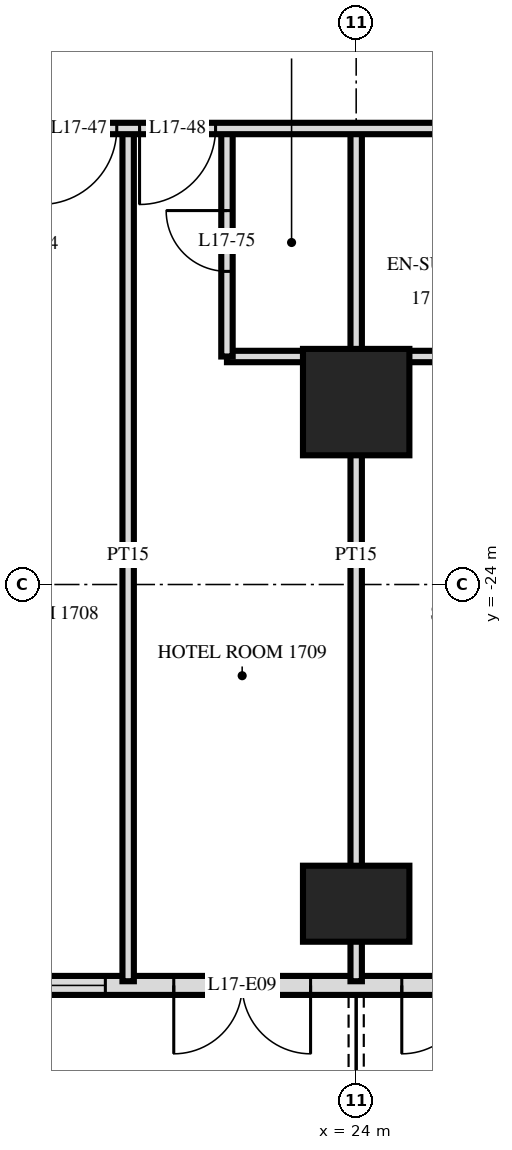
"""IFC4 building model, lengths in metres.
Left out: names, types, materials, properties, quantities, classifications, styles, units other than length and angle.
Written with IfcOpenShell. Run it as: python <this file> out.ifc"""

import sys

from ifc_helpers import new_model, si_unit, direction, frame, frame_2d, origin, origin_2d, place, context, subcontext, project, spatial, rectangle, extrude, element, fill, save


model = new_model("IFC4")
c1 = context("Model", 3, precision=1e-05, world=origin(), true_north=direction((0.0, 1.0)))
c2 = subcontext(c1, "Body", "Model", "MODEL_VIEW")
j1 = project(units=[si_unit("LENGTHUNIT", "METRE"), si_unit("PLANEANGLEUNIT", "RADIAN")], contexts=[c1])
p1 = place(None, origin())
s1 = spatial("IfcSite", under=j1, at=p1, CompositionType="ELEMENT")
p2 = place(p1, origin())
s2 = spatial("IfcBuilding", under=s1, at=p2, CompositionType="ELEMENT")
p3 = place(p2, frame((0.0, 0.0, 70.8)))
s3 = spatial("IfcBuildingStorey", under=s2, at=p3, CompositionType="ELEMENT", Elevation=70.8)
p4 = place(p3, frame((24.0, -28.2, 0.0), z_axis=(0.0, 0.0, 1.0), x_axis=(1.0, 0.0, 0.0)))
e1 = element("IfcColumn", 1, at=p4, inside=s3, PredefinedType="COLUMN", context=c2, shape_type="SweptSolid", body=[
    extrude(rectangle(XDim=1.4, YDim=1.0, at=origin_2d()), origin(), (0.0, 0.0, 1.0), 3.6),
])
p5 = place(p3, frame((24.0, -21.6, 0.0), z_axis=(0.0, 0.0, 1.0), x_axis=(1.0, 0.0, 0.0)))
e2 = element("IfcColumn", 2, at=p5, inside=s3, PredefinedType="COLUMN", context=c2, shape_type="SweptSolid", body=[
    extrude(rectangle(XDim=1.4, YDim=1.4, at=origin_2d()), origin(), (0.0, 0.0, 1.0), 3.6),
])
p6 = place(p3, frame((-28.775, -29.275, 0.0), z_axis=(0.0, 0.0, 1.0), x_axis=(1.0, 0.0, 0.0)))
e3 = element("IfcWall", 3, at=p6, inside=s3, PredefinedType="SOLIDWALL", context=c2, shape_type="SweptSolid", body=[
    extrude(rectangle(XDim=57.551, YDim=0.25, at=frame_2d((28.775, 0.0))), origin(), (0.0, 0.0, 1.0), 3.32),
])
p7 = place(p6, frame((0.575, 0.0, 0.0)))
e4 = element("IfcOpeningElement", 4, at=p7, cuts=e3, PredefinedType="OPENING", context=c2, shape_type="SweptSolid", body=[
    extrude(rectangle(XDim=1.8, YDim=2.4, at=frame_2d((0.9, 1.2))), frame((0.0, 0.135, 0.0), z_axis=(0.0, -1.0, 0.0), x_axis=(1.0, 0.0, 0.0)), (0.0, 0.0, 1.0), 0.27),
])
p8 = place(p6, frame((5.075, 0.0, 0.3)))
e5 = element("IfcOpeningElement", 5, at=p8, cuts=e3, PredefinedType="OPENING", context=c2, shape_type="SweptSolid", body=[
    extrude(rectangle(XDim=2.4, YDim=2.1, at=frame_2d((1.2, 1.05))), frame((0.0, 0.135, 0.0), z_axis=(0.0, -1.0, 0.0), x_axis=(1.0, 0.0, 0.0)), (0.0, 0.0, 1.0), 0.27),
])
p9 = place(p6, frame((8.375, 0.0, 0.0)))
e6 = element("IfcOpeningElement", 6, at=p9, cuts=e3, PredefinedType="OPENING", context=c2, shape_type="SweptSolid", body=[
    extrude(rectangle(XDim=1.8, YDim=2.4, at=frame_2d((0.9, 1.2))), frame((0.0, 0.135, 0.0), z_axis=(0.0, -1.0, 0.0), x_axis=(1.0, 0.0, 0.0)), (0.0, 0.0, 1.0), 0.27),
])
p10 = place(p6, frame((11.375, 0.0, 0.0)))
e7 = element("IfcOpeningElement", 7, at=p10, cuts=e3, PredefinedType="OPENING", context=c2, shape_type="SweptSolid", body=[
    extrude(rectangle(XDim=1.8, YDim=2.4, at=frame_2d((0.9, 1.2))), frame((0.0, 0.135, 0.0), z_axis=(0.0, -1.0, 0.0), x_axis=(1.0, 0.0, 0.0)), (0.0, 0.0, 1.0), 0.27),
])
p11 = place(p6, frame((14.075, 0.0, 0.3)))
e8 = element("IfcOpeningElement", 8, at=p11, cuts=e3, PredefinedType="OPENING", context=c2, shape_type="SweptSolid", body=[
    extrude(rectangle(XDim=2.4, YDim=2.1, at=frame_2d((1.2, 1.05))), frame((0.0, 0.135, 0.0), z_axis=(0.0, -1.0, 0.0), x_axis=(1.0, 0.0, 0.0)), (0.0, 0.0, 1.0), 0.27),
])
p12 = place(p6, frame((17.375, 0.0, 0.0)))
e9 = element("IfcOpeningElement", 9, at=p12, cuts=e3, PredefinedType="OPENING", context=c2, shape_type="SweptSolid", body=[
    extrude(rectangle(XDim=1.8, YDim=2.4, at=frame_2d((0.9, 1.2))), frame((0.0, 0.135, 0.0), z_axis=(0.0, -1.0, 0.0), x_axis=(1.0, 0.0, 0.0)), (0.0, 0.0, 1.0), 0.27),
])
p13 = place(p6, frame((20.075, 0.0, 0.3)))
e10 = element("IfcOpeningElement", 10, at=p13, cuts=e3, PredefinedType="OPENING", context=c2, shape_type="SweptSolid", body=[
    extrude(rectangle(XDim=2.4, YDim=2.1, at=frame_2d((1.2, 1.05))), frame((0.0, 0.135, 0.0), z_axis=(0.0, -1.0, 0.0), x_axis=(1.0, 0.0, 0.0)), (0.0, 0.0, 1.0), 0.27),
])
p14 = place(p6, frame((23.075, 0.0, 0.3)))
e11 = element("IfcOpeningElement", 11, at=p14, cuts=e3, PredefinedType="OPENING", context=c2, shape_type="SweptSolid", body=[
    extrude(rectangle(XDim=2.4, YDim=2.1, at=frame_2d((1.2, 1.05))), frame((0.0, 0.135, 0.0), z_axis=(0.0, -1.0, 0.0), x_axis=(1.0, 0.0, 0.0)), (0.0, 0.0, 1.0), 0.27),
])
p15 = place(p6, frame((26.375, 0.0, 0.0)))
e12 = element("IfcOpeningElement", 12, at=p15, cuts=e3, PredefinedType="OPENING", context=c2, shape_type="SweptSolid", body=[
    extrude(rectangle(XDim=1.8, YDim=2.4, at=frame_2d((0.9, 1.2))), frame((0.0, 0.135, 0.0), z_axis=(0.0, -1.0, 0.0), x_axis=(1.0, 0.0, 0.0)), (0.0, 0.0, 1.0), 0.27),
])
p16 = place(p6, frame((29.375, 0.0, 0.0)))
e13 = element("IfcOpeningElement", 13, at=p16, cuts=e3, PredefinedType="OPENING", context=c2, shape_type="SweptSolid", body=[
    extrude(rectangle(XDim=1.8, YDim=2.4, at=frame_2d((0.9, 1.2))), frame((0.0, 0.135, 0.0), z_axis=(0.0, -1.0, 0.0), x_axis=(1.0, 0.0, 0.0)), (0.0, 0.0, 1.0), 0.27),
])
p17 = place(p6, frame((32.075, 0.0, 0.3)))
e14 = element("IfcOpeningElement", 14, at=p17, cuts=e3, PredefinedType="OPENING", context=c2, shape_type="SweptSolid", body=[
    extrude(rectangle(XDim=2.4, YDim=2.1, at=frame_2d((1.2, 1.05))), frame((0.0, 0.135, 0.0), z_axis=(0.0, -1.0, 0.0), x_axis=(1.0, 0.0, 0.0)), (0.0, 0.0, 1.0), 0.27),
])
p18 = place(p6, frame((35.375, 0.0, 0.0)))
e15 = element("IfcOpeningElement", 15, at=p18, cuts=e3, PredefinedType="OPENING", context=c2, shape_type="SweptSolid", body=[
    extrude(rectangle(XDim=1.8, YDim=2.4, at=frame_2d((0.9, 1.2))), frame((0.0, 0.135, 0.0), z_axis=(0.0, -1.0, 0.0), x_axis=(1.0, 0.0, 0.0)), (0.0, 0.0, 1.0), 0.27),
])
p19 = place(p6, frame((38.075, 0.0, 0.3)))
e16 = element("IfcOpeningElement", 16, at=p19, cuts=e3, PredefinedType="OPENING", context=c2, shape_type="SweptSolid", body=[
    extrude(rectangle(XDim=2.4, YDim=2.1, at=frame_2d((1.2, 1.05))), frame((0.0, 0.135, 0.0), z_axis=(0.0, -1.0, 0.0), x_axis=(1.0, 0.0, 0.0)), (0.0, 0.0, 1.0), 0.27),
])
p20 = place(p6, frame((41.075, 0.0, 0.3)))
e17 = element("IfcOpeningElement", 17, at=p20, cuts=e3, PredefinedType="OPENING", context=c2, shape_type="SweptSolid", body=[
    extrude(rectangle(XDim=2.4, YDim=2.1, at=frame_2d((1.2, 1.05))), frame((0.0, 0.135, 0.0), z_axis=(0.0, -1.0, 0.0), x_axis=(1.0, 0.0, 0.0)), (0.0, 0.0, 1.0), 0.27),
])
p21 = place(p6, frame((44.375, 0.0, 0.0)))
e18 = element("IfcOpeningElement", 18, at=p21, cuts=e3, PredefinedType="OPENING", context=c2, shape_type="SweptSolid", body=[
    extrude(rectangle(XDim=1.8, YDim=2.4, at=frame_2d((0.9, 1.2))), frame((0.0, 0.135, 0.0), z_axis=(0.0, -1.0, 0.0), x_axis=(1.0, 0.0, 0.0)), (0.0, 0.0, 1.0), 0.27),
])
p22 = place(p6, frame((47.075, 0.0, 0.3)))
e19 = element("IfcOpeningElement", 19, at=p22, cuts=e3, PredefinedType="OPENING", context=c2, shape_type="SweptSolid", body=[
    extrude(rectangle(XDim=2.4, YDim=2.1, at=frame_2d((1.2, 1.05))), frame((0.0, 0.135, 0.0), z_axis=(0.0, -1.0, 0.0), x_axis=(1.0, 0.0, 0.0)), (0.0, 0.0, 1.0), 0.27),
])
p23 = place(p6, frame((50.375, 0.0, 0.0)))
e20 = element("IfcOpeningElement", 20, at=p23, cuts=e3, PredefinedType="OPENING", context=c2, shape_type="SweptSolid", body=[
    extrude(rectangle(XDim=1.8, YDim=2.4, at=frame_2d((0.9, 1.2))), frame((0.0, 0.135, 0.0), z_axis=(0.0, -1.0, 0.0), x_axis=(1.0, 0.0, 0.0)), (0.0, 0.0, 1.0), 0.27),
])
p24 = place(p6, frame((53.375, 0.0, 0.0)))
e21 = element("IfcOpeningElement", 21, at=p24, cuts=e3, PredefinedType="OPENING", context=c2, shape_type="SweptSolid", body=[
    extrude(rectangle(XDim=1.8, YDim=2.4, at=frame_2d((0.9, 1.2))), frame((0.0, 0.135, 0.0), z_axis=(0.0, -1.0, 0.0), x_axis=(1.0, 0.0, 0.0)), (0.0, 0.0, 1.0), 0.27),
])
p25 = place(p3, frame((24.0, -29.22, 0.0), z_axis=(0.0, 0.0, 1.0), x_axis=(0.0, 1.0, 0.0)))
e22 = element("IfcWall", 22, at=p25, inside=s3, PredefinedType="PARTITIONING", context=c2, shape_type="SweptSolid", body=[
    extrude(rectangle(XDim=11.22, YDim=0.15, at=frame_2d((5.61, 0.0))), origin(), (0.0, 0.0, 1.0), 3.32),
])
p26 = place(p3, frame((22.3, -21.0, 0.0), z_axis=(0.0, 0.0, 1.0), x_axis=(0.0, 1.0, 0.0)))
e23 = element("IfcWall", 23, at=p26, inside=s3, PredefinedType="PARTITIONING", context=c2, shape_type="SweptSolid", body=[
    extrude(rectangle(XDim=3.0, YDim=0.15, at=frame_2d((1.5, 0.0))), origin(), (0.0, 0.0, 1.0), 3.32),
])
p27 = place(p26, frame((1.12, 0.0, 0.0)))
e24 = element("IfcOpeningElement", 24, at=p27, cuts=e23, PredefinedType="OPENING", context=c2, shape_type="SweptSolid", body=[
    extrude(rectangle(XDim=0.8, YDim=2.1, at=frame_2d((0.4, 1.05))), frame((0.0, 0.085, 0.0), z_axis=(0.0, -1.0, 0.0), x_axis=(1.0, 0.0, 0.0)), (0.0, 0.0, 1.0), 0.17),
])
p28 = place(p3, frame((21.0, -29.22, 0.0), z_axis=(0.0, 0.0, 1.0), x_axis=(0.0, 1.0, 0.0)))
e25 = element("IfcWall", 25, at=p28, inside=s3, PredefinedType="PARTITIONING", context=c2, shape_type="SweptSolid", body=[
    extrude(rectangle(XDim=11.22, YDim=0.15, at=frame_2d((5.61, 0.0))), origin(), (0.0, 0.0, 1.0), 3.32),
])
p29 = place(p3, frame((22.3, -21.0, 0.0), z_axis=(0.0, 0.0, 1.0), x_axis=(1.0, 0.0, 0.0)))
e26 = element("IfcWall", 26, at=p29, inside=s3, PredefinedType="PARTITIONING", context=c2, shape_type="SweptSolid", body=[
    extrude(rectangle(XDim=4.7, YDim=0.15, at=frame_2d((2.35, 0.0))), origin(), (0.0, 0.0, 1.0), 3.32),
])
p30 = place(p3, frame((-33.12, -18.0, 0.0), z_axis=(0.0, 0.0, 1.0), x_axis=(1.0, 0.0, 0.0)))
e27 = element("IfcWall", 27, at=p30, inside=s3, PredefinedType="PARTITIONING", context=c2, shape_type="SweptSolid", body=[
    extrude(rectangle(XDim=66.24, YDim=0.15, at=frame_2d((33.12, 0.0))), origin(), (0.0, 0.0, 1.0), 3.32),
])
p31 = place(p30, frame((15.27, 0.0, 0.0)))
e28 = element("IfcOpeningElement", 28, at=p31, cuts=e27, PredefinedType="OPENING", context=c2, shape_type="SweptSolid", body=[
    extrude(rectangle(XDim=1.0, YDim=2.1, at=frame_2d((0.5, 1.05))), frame((0.0, 0.085, 0.0), z_axis=(0.0, -1.0, 0.0), x_axis=(1.0, 0.0, 0.0)), (0.0, 0.0, 1.0), 0.17),
])
p32 = place(p30, frame((21.22, 0.0, 0.0)))
e29 = element("IfcOpeningElement", 29, at=p32, cuts=e27, PredefinedType="OPENING", context=c2, shape_type="SweptSolid", body=[
    extrude(rectangle(XDim=1.0, YDim=2.1, at=frame_2d((0.5, 1.05))), frame((0.0, 0.085, 0.0), z_axis=(0.0, -1.0, 0.0), x_axis=(1.0, 0.0, 0.0)), (0.0, 0.0, 1.0), 0.17),
])
p33 = place(p30, frame((24.27, 0.0, 0.0)))
e30 = element("IfcOpeningElement", 30, at=p33, cuts=e27, PredefinedType="OPENING", context=c2, shape_type="SweptSolid", body=[
    extrude(rectangle(XDim=1.0, YDim=2.1, at=frame_2d((0.5, 1.05))), frame((0.0, 0.085, 0.0), z_axis=(0.0, -1.0, 0.0), x_axis=(1.0, 0.0, 0.0)), (0.0, 0.0, 1.0), 0.17),
])
p34 = place(p30, frame((30.97, 0.0, 0.0)))
e31 = element("IfcOpeningElement", 31, at=p34, cuts=e27, PredefinedType="OPENING", context=c2, shape_type="SweptSolid", body=[
    extrude(rectangle(XDim=1.0, YDim=2.1, at=frame_2d((0.5, 1.05))), frame((0.0, 0.085, 0.0), z_axis=(0.0, -1.0, 0.0), x_axis=(1.0, 0.0, 0.0)), (0.0, 0.0, 1.0), 0.17),
])
p35 = place(p30, frame((40.42, 0.0, 0.0)))
e32 = element("IfcOpeningElement", 32, at=p35, cuts=e27, PredefinedType="OPENING", context=c2, shape_type="SweptSolid", body=[
    extrude(rectangle(XDim=1.0, YDim=2.1, at=frame_2d((0.5, 1.05))), frame((0.0, 0.085, 0.0), z_axis=(0.0, -1.0, 0.0), x_axis=(1.0, 0.0, 0.0)), (0.0, 0.0, 1.0), 0.17),
])
p36 = place(p30, frame((43.97, 0.0, 0.0)))
e33 = element("IfcOpeningElement", 33, at=p36, cuts=e27, PredefinedType="OPENING", context=c2, shape_type="SweptSolid", body=[
    extrude(rectangle(XDim=1.0, YDim=2.1, at=frame_2d((0.5, 1.05))), frame((0.0, 0.085, 0.0), z_axis=(0.0, -1.0, 0.0), x_axis=(1.0, 0.0, 0.0)), (0.0, 0.0, 1.0), 0.17),
])
p37 = place(p30, frame((45.52, 0.0, 0.0)))
e34 = element("IfcOpeningElement", 34, at=p37, cuts=e27, PredefinedType="OPENING", context=c2, shape_type="SweptSolid", body=[
    extrude(rectangle(XDim=1.0, YDim=2.1, at=frame_2d((0.5, 1.05))), frame((0.0, 0.085, 0.0), z_axis=(0.0, -1.0, 0.0), x_axis=(1.0, 0.0, 0.0)), (0.0, 0.0, 1.0), 0.17),
])
p38 = place(p30, frame((52.97, 0.0, 0.0)))
e35 = element("IfcOpeningElement", 35, at=p38, cuts=e27, PredefinedType="OPENING", context=c2, shape_type="SweptSolid", body=[
    extrude(rectangle(XDim=1.0, YDim=2.1, at=frame_2d((0.5, 1.05))), frame((0.0, 0.085, 0.0), z_axis=(0.0, -1.0, 0.0), x_axis=(1.0, 0.0, 0.0)), (0.0, 0.0, 1.0), 0.17),
])
p39 = place(p30, frame((54.27, 0.0, 0.0)))
e36 = element("IfcOpeningElement", 36, at=p39, cuts=e27, PredefinedType="OPENING", context=c2, shape_type="SweptSolid", body=[
    extrude(rectangle(XDim=1.0, YDim=2.1, at=frame_2d((0.5, 1.05))), frame((0.0, 0.085, 0.0), z_axis=(0.0, -1.0, 0.0), x_axis=(1.0, 0.0, 0.0)), (0.0, 0.0, 1.0), 0.17),
])
p40 = place(p30, frame((13.42, 0.0, 0.0)))
e37 = element("IfcOpeningElement", 37, at=p40, cuts=e27, PredefinedType="OPENING", context=c2, shape_type="SweptSolid", body=[
    extrude(rectangle(XDim=1.0, YDim=2.1, at=frame_2d((0.5, 1.05))), frame((0.0, 0.085, 0.0), z_axis=(0.0, -1.0, 0.0), x_axis=(1.0, 0.0, 0.0)), (0.0, 0.0, 1.0), 0.17),
])
p41 = place(p30, frame((60.82, 0.0, 0.0)))
e38 = element("IfcOpeningElement", 38, at=p41, cuts=e27, PredefinedType="OPENING", context=c2, shape_type="SweptSolid", body=[
    extrude(rectangle(XDim=1.0, YDim=2.1, at=frame_2d((0.5, 1.05))), frame((0.0, 0.085, 0.0), z_axis=(0.0, -1.0, 0.0), x_axis=(1.0, 0.0, 0.0)), (0.0, 0.0, 1.0), 0.17),
])
p42 = place(p22, origin())
e39 = element("IfcWindow", 39, at=p42, inside=s3, PartitioningType="SINGLE_PANEL", PredefinedType="WINDOW", context=c2, shape_type="SweptSolid", body=[
    extrude(rectangle(XDim=2.4, YDim=2.1, at=frame_2d((1.2, 1.05))), frame((0.0, 0.03, 0.0), z_axis=(0.0, -1.0, 0.0), x_axis=(1.0, 0.0, 0.0)), (0.0, 0.0, 1.0), 0.06),
])
fill(e19, e39)
p43 = place(p23, frame((0.9, 0.0, 0.0), z_axis=(0.0, 0.0, 1.0), x_axis=(-1.0, 0.0, 0.0)))
e40 = element("IfcDoor", 40, at=p43, inside=s3, OperationType="DOUBLE_DOOR_SINGLE_SWING", PredefinedType="DOOR", context=c2, shape_type="SweptSolid", body=[
    extrude(rectangle(XDim=1.8, YDim=2.4, at=frame_2d((0.0, 1.2))), frame((0.0, -0.025, 0.0), z_axis=(0.0, 1.0, 0.0), x_axis=(-1.0, 0.0, 0.0)), (0.0, 0.0, 1.0), 0.05),
])
fill(e20, e40)
p44 = place(p24, frame((0.9, 0.0, 0.0), z_axis=(0.0, 0.0, 1.0), x_axis=(-1.0, 0.0, 0.0)))
e41 = element("IfcDoor", 41, at=p44, inside=s3, OperationType="DOUBLE_DOOR_SINGLE_SWING", PredefinedType="DOOR", context=c2, shape_type="SweptSolid", body=[
    extrude(rectangle(XDim=1.8, YDim=2.4, at=frame_2d((0.0, 1.2))), frame((0.0, -0.025, 0.0), z_axis=(0.0, 1.0, 0.0), x_axis=(-1.0, 0.0, 0.0)), (0.0, 0.0, 1.0), 0.05),
])
fill(e21, e41)
p45 = place(p38, frame((0.5, 0.0, 0.0), z_axis=(0.0, 0.0, 1.0), x_axis=(-1.0, 0.0, 0.0)))
e42 = element("IfcDoor", 42, at=p45, inside=s3, OperationType="SINGLE_SWING_LEFT", PredefinedType="DOOR", context=c2, shape_type="SweptSolid", body=[
    extrude(rectangle(XDim=1.0, YDim=2.1, at=frame_2d((0.0, 1.05))), frame((0.0, -0.025, 0.0), z_axis=(0.0, 1.0, 0.0), x_axis=(-1.0, 0.0, 0.0)), (0.0, 0.0, 1.0), 0.05),
])
fill(e35, e42)
p46 = place(p39, frame((0.5, 0.0, 0.0), z_axis=(0.0, 0.0, 1.0), x_axis=(-1.0, 0.0, 0.0)))
e43 = element("IfcDoor", 43, at=p46, inside=s3, OperationType="SINGLE_SWING_LEFT", PredefinedType="DOOR", context=c2, shape_type="SweptSolid", body=[
    extrude(rectangle(XDim=1.0, YDim=2.1, at=frame_2d((0.0, 1.05))), frame((0.0, -0.025, 0.0), z_axis=(0.0, 1.0, 0.0), x_axis=(-1.0, 0.0, 0.0)), (0.0, 0.0, 1.0), 0.05),
])
fill(e36, e43)
p47 = place(p27, origin())
e44 = element("IfcDoor", 44, at=p47, inside=s3, OperationType="SINGLE_SWING_LEFT", PredefinedType="DOOR", context=c2, shape_type="SweptSolid", body=[
    extrude(rectangle(XDim=0.8, YDim=2.1, at=frame_2d((0.4, 1.05))), frame((0.0, 0.025, 0.0), z_axis=(0.0, -1.0, 0.0), x_axis=(1.0, 0.0, 0.0)), (0.0, 0.0, 1.0), 0.05),
])
fill(e24, e44)
save(model, sys.argv[1])
